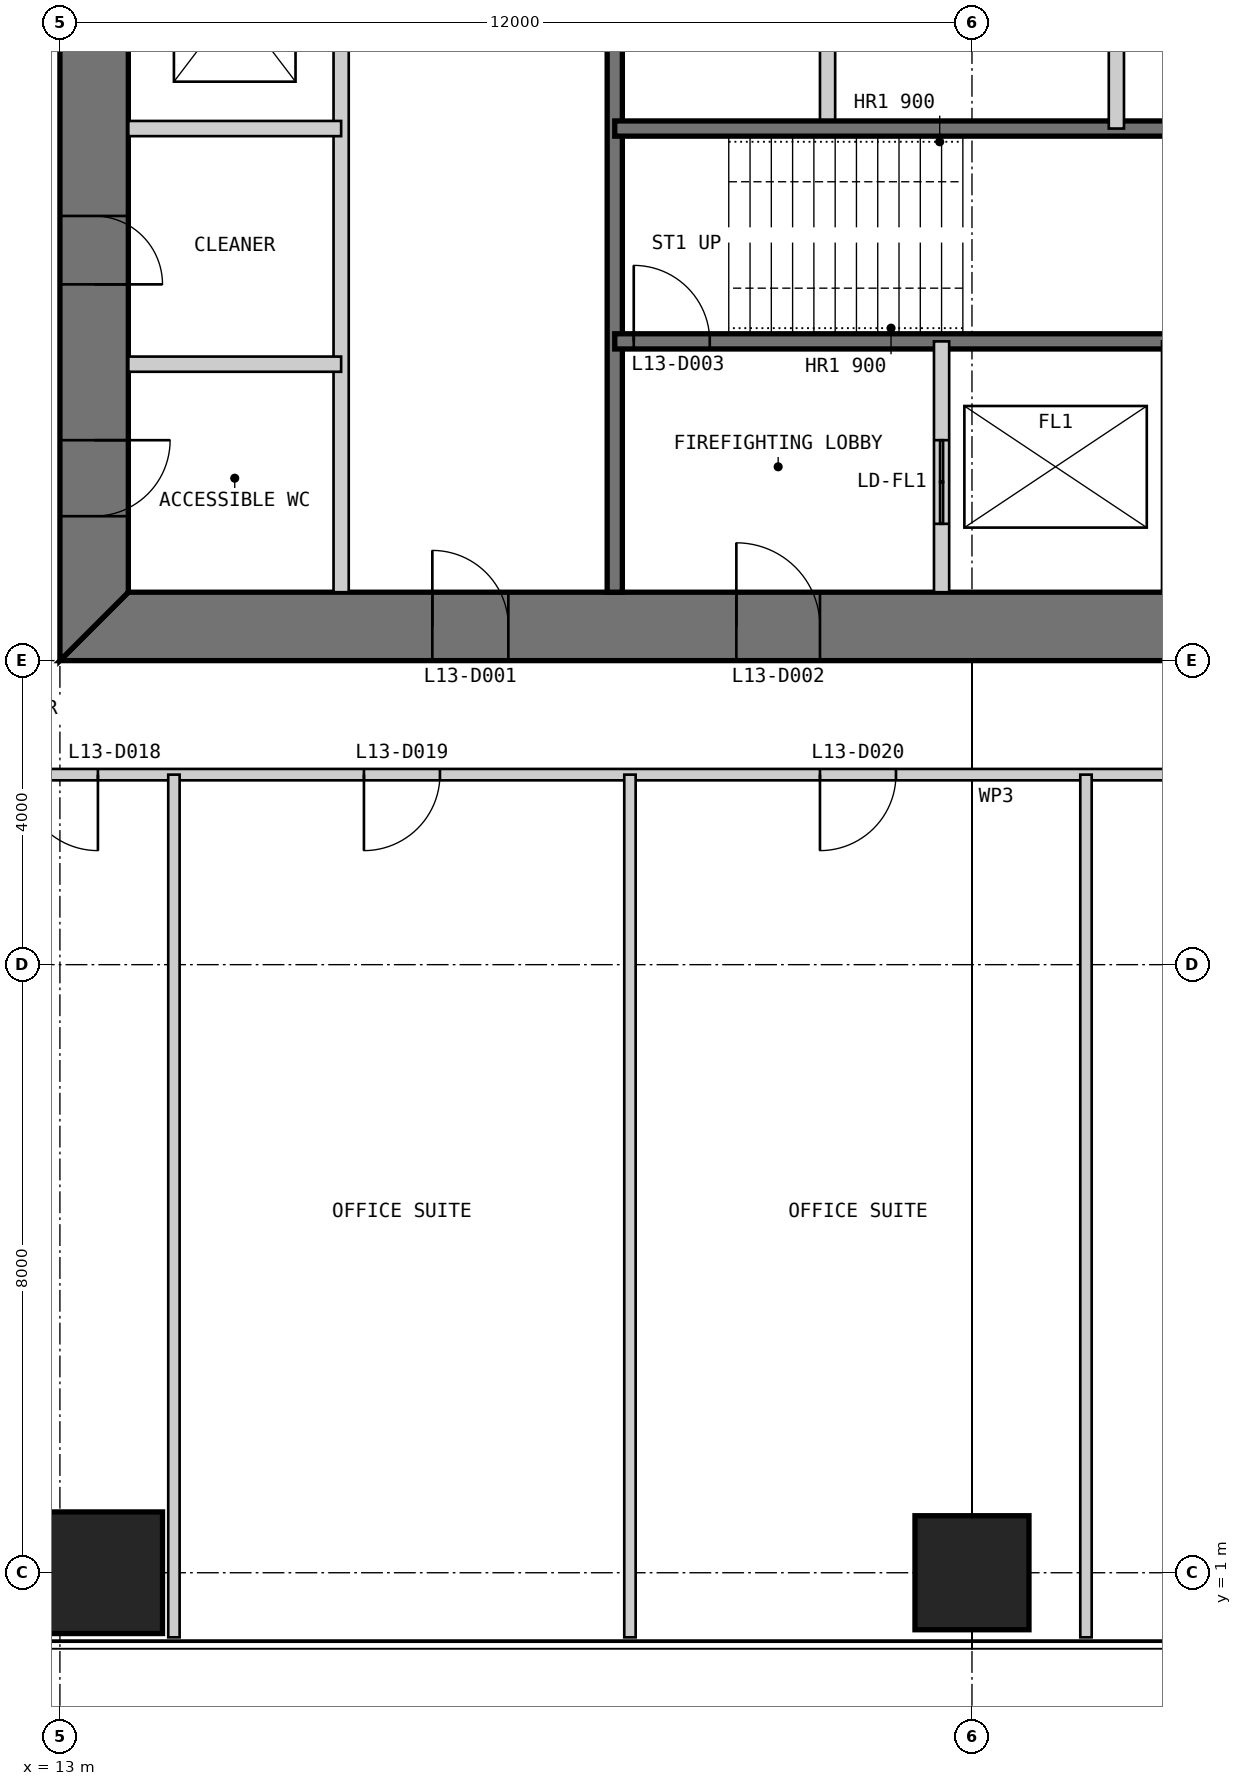
"""IFC4 building model, lengths in metres.
Left out: names, types, materials, properties, quantities, classifications, styles, units other than length and angle.
Written with IfcOpenShell. Run it as: python <this file> out.ifc"""

import sys

from ifc_helpers import new_model, si_unit, direction, frame, frame_2d, origin, origin_2d, place, context, subcontext, project, spatial, polyline, rectangle, outline, extrude, element, fill, save


model = new_model("IFC4")
c1 = context("Model", 3, precision=1e-05, world=origin(), true_north=direction((0.0, 1.0)))
c2 = subcontext(c1, "Body", "Model", "MODEL_VIEW")
j1 = project(units=[si_unit("LENGTHUNIT", "METRE"), si_unit("PLANEANGLEUNIT", "RADIAN")], contexts=[c1])
p1 = place(None, origin())
s1 = spatial("IfcSite", under=j1, at=p1, CompositionType="ELEMENT")
p2 = place(p1, origin())
s2 = spatial("IfcBuilding", under=s1, at=p2, CompositionType="ELEMENT")
p3 = place(p2, frame((0.0, 0.0, 59.0)))
s3 = spatial("IfcBuildingStorey", under=s2, at=p3, CompositionType="ELEMENT", Elevation=59.0)
p4 = place(p3, frame((13.0, 1.0, 0.0), z_axis=(0.0, 0.0, 1.0), x_axis=(1.0, 0.0, 0.0)))
e1 = element("IfcColumn", 1, at=p4, inside=s3, PredefinedType="COLUMN", context=c2, shape_type="SweptSolid", body=[
    extrude(rectangle(XDim=2.7, YDim=1.6, at=origin_2d()), origin(), (0.0, 0.0, 1.0), 4.0),
])
p5 = place(p3, frame((25.0, 1.0, 0.0), z_axis=(0.0, 0.0, 1.0), x_axis=(1.0, 0.0, 0.0)))
e2 = element("IfcColumn", 2, at=p5, inside=s3, PredefinedType="COLUMN", context=c2, shape_type="SweptSolid", body=[
    extrude(rectangle(XDim=1.5, YDim=1.5, at=origin_2d()), origin(), (0.0, 0.0, 1.0), 4.0),
])
p6 = place(p3, frame((13.0, 13.45, 0.0), z_axis=(0.0, 0.0, 1.0), x_axis=(1.0, 0.0, 0.0)))
e3 = element("IfcWall", 3, at=p6, inside=s3, PredefinedType="SHEAR", context=c2, shape_type="SweptSolid", body=[
    extrude(outline(polyline([(0.0, -0.45), (24.0, -0.45), (23.1, 0.45), (0.9, 0.45), (0.0, -0.45)])), origin(), (0.0, 0.0, 1.0), 4.0),
])
p7 = place(p6, frame((4.9, 0.0, 0.0)))
e4 = element("IfcOpeningElement", 4, at=p7, cuts=e3, PredefinedType="OPENING", context=c2, shape_type="SweptSolid", body=[
    extrude(rectangle(XDim=1.0, YDim=2.2, at=frame_2d((0.5, 1.1))), frame((0.0, 0.46, 0.0), z_axis=(0.0, -1.0, 0.0), x_axis=(1.0, 0.0, 0.0)), (0.0, 0.0, 1.0), 0.92),
])
p8 = place(p6, frame((8.9, 0.0, 0.0)))
e5 = element("IfcOpeningElement", 5, at=p8, cuts=e3, PredefinedType="OPENING", context=c2, shape_type="SweptSolid", body=[
    extrude(rectangle(XDim=1.1, YDim=2.2, at=frame_2d((0.55, 1.1))), frame((0.0, 0.46, 0.0), z_axis=(0.0, -1.0, 0.0), x_axis=(1.0, 0.0, 0.0)), (0.0, 0.0, 1.0), 0.92),
])
p9 = place(p6, frame((15.05, 0.0, 0.0)))
e6 = element("IfcOpeningElement", 6, at=p9, cuts=e3, PredefinedType="OPENING", context=c2, shape_type="SweptSolid", body=[
    extrude(rectangle(XDim=0.9, YDim=2.2, at=frame_2d((0.45, 1.1))), frame((0.0, 0.46, 0.0), z_axis=(0.0, -1.0, 0.0), x_axis=(1.0, 0.0, 0.0)), (0.0, 0.0, 1.0), 0.92),
])
p10 = place(p6, frame((17.9, 0.0, 0.0)))
e7 = element("IfcOpeningElement", 7, at=p10, cuts=e3, PredefinedType="OPENING", context=c2, shape_type="SweptSolid", body=[
    extrude(rectangle(XDim=1.0, YDim=2.2, at=frame_2d((0.5, 1.1))), frame((0.0, 0.46, 0.0), z_axis=(0.0, -1.0, 0.0), x_axis=(1.0, 0.0, 0.0)), (0.0, 0.0, 1.0), 0.92),
])
p11 = place(p6, frame((21.4, 0.0, 0.0)))
e8 = element("IfcOpeningElement", 8, at=p11, cuts=e3, PredefinedType="OPENING", context=c2, shape_type="SweptSolid", body=[
    extrude(rectangle(XDim=1.0, YDim=2.2, at=frame_2d((0.5, 1.1))), frame((0.0, 0.46, 0.0), z_axis=(0.0, -1.0, 0.0), x_axis=(1.0, 0.0, 0.0)), (0.0, 0.0, 1.0), 0.92),
])
p12 = place(p3, frame((13.45, 36.1, 0.0), z_axis=(0.0, 0.0, 1.0), x_axis=(0.0, -1.0, 0.0)))
e9 = element("IfcWall", 9, at=p12, inside=s3, PredefinedType="SHEAR", context=c2, shape_type="SweptSolid", body=[
    extrude(outline(polyline([(-0.9, -0.45), (23.1, -0.45), (22.2, 0.45), (0.0, 0.45), (-0.9, -0.45)])), origin(), (0.0, 0.0, 1.0), 4.0),
])
p13 = place(p12, frame((20.2, 0.0, 0.0)))
e10 = element("IfcOpeningElement", 10, at=p13, cuts=e9, PredefinedType="OPENING", context=c2, shape_type="SweptSolid", body=[
    extrude(rectangle(XDim=1.0, YDim=2.2, at=frame_2d((0.5, 1.1))), frame((0.0, 0.46, 0.0), z_axis=(0.0, -1.0, 0.0), x_axis=(1.0, 0.0, 0.0)), (0.0, 0.0, 1.0), 0.92),
])
p14 = place(p12, frame((17.25, 0.0, 0.0)))
e11 = element("IfcOpeningElement", 11, at=p14, cuts=e9, PredefinedType="OPENING", context=c2, shape_type="SweptSolid", body=[
    extrude(rectangle(XDim=0.9, YDim=2.2, at=frame_2d((0.45, 1.1))), frame((0.0, 0.46, 0.0), z_axis=(0.0, -1.0, 0.0), x_axis=(1.0, 0.0, 0.0)), (0.0, 0.0, 1.0), 0.92),
])
p15 = place(p3, frame((16.7, 13.9, 0.0), z_axis=(0.0, 0.0, 1.0), x_axis=(0.0, 1.0, 0.0)))
e12 = element("IfcWall", 12, at=p15, inside=s3, PredefinedType="PARTITIONING", context=c2, shape_type="SweptSolid", body=[
    extrude(rectangle(XDim=16.1, YDim=0.2, at=frame_2d((8.05, 0.0))), origin(), (0.0, 0.0, 1.0), 3.8),
])
p16 = place(p15, frame((7.217, 0.0, 0.0)))
e13 = element("IfcOpeningElement", 13, at=p16, cuts=e12, PredefinedType="OPENING", context=c2, shape_type="SweptSolid", body=[
    extrude(rectangle(XDim=1.1, YDim=2.2, at=frame_2d((0.55, 1.1))), frame((0.0, 0.11, 0.0), z_axis=(0.0, -1.0, 0.0), x_axis=(1.0, 0.0, 0.0)), (0.0, 0.0, 1.0), 0.22),
])
p17 = place(p15, frame((10.55, 0.0, 0.0)))
e14 = element("IfcOpeningElement", 14, at=p17, cuts=e12, PredefinedType="OPENING", context=c2, shape_type="SweptSolid", body=[
    extrude(rectangle(XDim=1.1, YDim=2.2, at=frame_2d((0.55, 1.1))), frame((0.0, 0.11, 0.0), z_axis=(0.0, -1.0, 0.0), x_axis=(1.0, 0.0, 0.0)), (0.0, 0.0, 1.0), 0.22),
])
p18 = place(p15, frame((13.883, 0.0, 0.0)))
e15 = element("IfcOpeningElement", 15, at=p18, cuts=e12, PredefinedType="OPENING", context=c2, shape_type="SweptSolid", body=[
    extrude(rectangle(XDim=1.1, YDim=2.2, at=frame_2d((0.55, 1.1))), frame((0.0, 0.11, 0.0), z_axis=(0.0, -1.0, 0.0), x_axis=(1.0, 0.0, 0.0)), (0.0, 0.0, 1.0), 0.22),
])
p19 = place(p3, frame((20.3, 13.9, 0.0), z_axis=(0.0, 0.0, 1.0), x_axis=(0.0, 1.0, 0.0)))
e16 = element("IfcWall", 16, at=p19, inside=s3, PredefinedType="SOLIDWALL", context=c2, shape_type="SweptSolid", body=[
    extrude(rectangle(XDim=16.1, YDim=0.2, at=frame_2d((8.05, 0.0))), origin(), (0.0, 0.0, 1.0), 3.8),
])
p20 = place(p3, frame((13.9, 20.0, 0.0), z_axis=(0.0, 0.0, 1.0), x_axis=(1.0, 0.0, 0.0)))
e17 = element("IfcWall", 17, at=p20, inside=s3, PredefinedType="PARTITIONING", context=c2, shape_type="SweptSolid", body=[
    extrude(rectangle(XDim=2.8, YDim=0.2, at=frame_2d((1.4, 0.0))), origin(), (0.0, 0.0, 1.0), 3.8),
])
p21 = place(p3, frame((23.1, 20.0, 0.0), z_axis=(0.0, 0.0, 1.0), x_axis=(0.0, 1.0, 0.0)))
e18 = element("IfcWall", 18, at=p21, inside=s3, PredefinedType="PARTITIONING", context=c2, shape_type="SweptSolid", body=[
    extrude(rectangle(XDim=10.0, YDim=0.2, at=frame_2d((5.0, 0.0))), origin(), (0.0, 0.0, 1.0), 3.8),
])
p22 = place(p3, frame((20.3, 17.2, 0.0), z_axis=(0.0, 0.0, 1.0), x_axis=(1.0, 0.0, 0.0)))
e19 = element("IfcWall", 19, at=p22, inside=s3, PredefinedType="SOLIDWALL", context=c2, shape_type="SweptSolid", body=[
    extrude(rectangle(XDim=9.4, YDim=0.2, at=frame_2d((4.7, 0.0))), origin(), (0.0, 0.0, 1.0), 3.8),
])
p23 = place(p22, frame((0.25, 0.0, 0.0)))
e20 = element("IfcOpeningElement", 20, at=p23, cuts=e19, PredefinedType="OPENING", context=c2, shape_type="SweptSolid", body=[
    extrude(rectangle(XDim=1.0, YDim=2.2, at=frame_2d((0.5, 1.1))), frame((0.0, 0.11, 0.0), z_axis=(0.0, -1.0, 0.0), x_axis=(1.0, 0.0, 0.0)), (0.0, 0.0, 1.0), 0.22),
])
p24 = place(p3, frame((20.3, 20.0, 0.0), z_axis=(0.0, 0.0, 1.0), x_axis=(1.0, 0.0, 0.0)))
e21 = element("IfcWall", 21, at=p24, inside=s3, PredefinedType="SOLIDWALL", context=c2, shape_type="SweptSolid", body=[
    extrude(rectangle(XDim=15.8, YDim=0.2, at=frame_2d((7.9, 0.0))), origin(), (0.0, 0.0, 1.0), 3.8),
])
p25 = place(p3, frame((24.6, 13.9, 0.0), z_axis=(0.0, 0.0, 1.0), x_axis=(0.0, 1.0, 0.0)))
e22 = element("IfcWall", 22, at=p25, inside=s3, PredefinedType="PARTITIONING", context=c2, shape_type="SweptSolid", body=[
    extrude(rectangle(XDim=3.3, YDim=0.2, at=frame_2d((1.65, 0.0))), origin(), (0.0, 0.0, 1.0), 3.8),
])
p26 = place(p25, frame((0.9, 0.0, 0.0)))
e23 = element("IfcOpeningElement", 23, at=p26, cuts=e22, PredefinedType="OPENING", context=c2, shape_type="SweptSolid", body=[
    extrude(rectangle(XDim=1.1, YDim=2.2, at=frame_2d((0.55, 1.1))), frame((0.0, 0.11, 0.0), z_axis=(0.0, -1.0, 0.0), x_axis=(1.0, 0.0, 0.0)), (0.0, 0.0, 1.0), 0.22),
])
p27 = place(p3, frame((13.9, 16.9, 0.0), z_axis=(0.0, 0.0, 1.0), x_axis=(1.0, 0.0, 0.0)))
e24 = element("IfcWall", 24, at=p27, inside=s3, PredefinedType="PARTITIONING", context=c2, shape_type="SweptSolid", body=[
    extrude(rectangle(XDim=2.8, YDim=0.2, at=frame_2d((1.4, 0.0))), origin(), (0.0, 0.0, 1.0), 3.8),
])
p28 = place(p3, frame((26.9, 30.0, 0.0), z_axis=(0.0, 0.0, 1.0), x_axis=(0.0, -1.0, 0.0)))
e25 = element("IfcWall", 25, at=p28, inside=s3, PredefinedType="PARTITIONING", context=c2, shape_type="SweptSolid", body=[
    extrude(rectangle(XDim=10.0, YDim=0.2, at=frame_2d((5.0, 0.0))), origin(), (0.0, 0.0, 1.0), 3.8),
])
p29 = place(p3, frame((11.5, 11.5, 0.0), z_axis=(0.0, 0.0, 1.0), x_axis=(1.0, 0.0, 0.0)))
e26 = element("IfcWall", 26, at=p29, inside=s3, PredefinedType="PARTITIONING", context=c2, shape_type="SweptSolid", body=[
    extrude(rectangle(XDim=27.0, YDim=0.15, at=frame_2d((13.5, 0.0))), origin(), (0.0, 0.0, 1.0), 3.85),
])
p30 = place(p29, frame((1.0, 0.0, 0.0)))
e27 = element("IfcOpeningElement", 27, at=p30, cuts=e26, PredefinedType="OPENING", context=c2, shape_type="SweptSolid", body=[
    extrude(rectangle(XDim=1.0, YDim=2.2, at=frame_2d((0.5, 1.1))), frame((0.0, 0.085, 0.0), z_axis=(0.0, -1.0, 0.0), x_axis=(1.0, 0.0, 0.0)), (0.0, 0.0, 1.0), 0.17),
])
p31 = place(p29, frame((5.5, 0.0, 0.0)))
e28 = element("IfcOpeningElement", 28, at=p31, cuts=e26, PredefinedType="OPENING", context=c2, shape_type="SweptSolid", body=[
    extrude(rectangle(XDim=1.0, YDim=2.2, at=frame_2d((0.5, 1.1))), frame((0.0, 0.085, 0.0), z_axis=(0.0, -1.0, 0.0), x_axis=(1.0, 0.0, 0.0)), (0.0, 0.0, 1.0), 0.17),
])
p32 = place(p29, frame((11.5, 0.0, 0.0)))
e29 = element("IfcOpeningElement", 29, at=p32, cuts=e26, PredefinedType="OPENING", context=c2, shape_type="SweptSolid", body=[
    extrude(rectangle(XDim=1.0, YDim=2.2, at=frame_2d((0.5, 1.1))), frame((0.0, 0.085, 0.0), z_axis=(0.0, -1.0, 0.0), x_axis=(1.0, 0.0, 0.0)), (0.0, 0.0, 1.0), 0.17),
])
p33 = place(p29, frame((19.0, 0.0, 0.0)))
e30 = element("IfcOpeningElement", 30, at=p33, cuts=e26, PredefinedType="OPENING", context=c2, shape_type="SweptSolid", body=[
    extrude(rectangle(XDim=1.0, YDim=2.2, at=frame_2d((0.5, 1.1))), frame((0.0, 0.085, 0.0), z_axis=(0.0, -1.0, 0.0), x_axis=(1.0, 0.0, 0.0)), (0.0, 0.0, 1.0), 0.17),
])
for number, where, z_axis, x_axis in (
    (31, (14.5, 0.15, 0.0), (0.0, 0.0, 1.0), (0.0, 1.0, 0.0)),
    (32, (20.5, 0.15, 0.0), (0.0, 0.0, 1.0), (0.0, 1.0, 0.0)),
    (33, (26.5, 0.15, 0.0), (0.0, 0.0, 1.0), (0.0, 1.0, 0.0)),
):
    element("IfcWall", number, at=place(p3, frame(where, z_axis=z_axis, x_axis=x_axis)), inside=s3, PredefinedType="PARTITIONING", context=c2, shape_type="SweptSolid", body=[
        extrude(rectangle(XDim=11.35, YDim=0.15, at=frame_2d((5.675, 0.0))), origin(), (0.0, 0.0, 1.0), 3.85),
    ])
p34 = place(p7, origin())
e34 = element("IfcDoor", 34, at=p34, inside=s3, OperationType="SINGLE_SWING_LEFT", PredefinedType="DOOR", context=c2, shape_type="SweptSolid", body=[
    extrude(rectangle(XDim=1.0, YDim=2.2, at=frame_2d((0.5, 1.1))), frame((0.0, 0.025, 0.0), z_axis=(0.0, -1.0, 0.0), x_axis=(1.0, 0.0, 0.0)), (0.0, 0.0, 1.0), 0.05),
    extrude(outline(polyline([(0.0, 0.0), (0.04, 0.0), (0.04, 2.16), (0.96, 2.16), (0.96, 0.0), (1.0, 0.0), (1.0, 2.2), (0.0, 2.2), (0.0, 0.0)])), frame((0.0, 0.3, 0.0), z_axis=(0.0, -1.0, 0.0), x_axis=(1.0, 0.0, 0.0)), (0.0, 0.0, 1.0), 0.6),
])
fill(e4, e34)
p35 = place(p8, origin())
e35 = element("IfcDoor", 35, at=p35, inside=s3, OperationType="SINGLE_SWING_LEFT", PredefinedType="DOOR", context=c2, shape_type="SweptSolid", body=[
    extrude(rectangle(XDim=1.1, YDim=2.2, at=frame_2d((0.55, 1.1))), frame((0.0, 0.025, 0.0), z_axis=(0.0, -1.0, 0.0), x_axis=(1.0, 0.0, 0.0)), (0.0, 0.0, 1.0), 0.05),
    extrude(outline(polyline([(0.0, 0.0), (0.04, 0.0), (0.04, 2.16), (1.06, 2.16), (1.06, 0.0), (1.1, 0.0), (1.1, 2.2), (0.0, 2.2), (0.0, 0.0)])), frame((0.0, 0.3, 0.0), z_axis=(0.0, -1.0, 0.0), x_axis=(1.0, 0.0, 0.0)), (0.0, 0.0, 1.0), 0.6),
])
fill(e5, e35)
p36 = place(p23, origin())
e36 = element("IfcDoor", 36, at=p36, inside=s3, OperationType="SINGLE_SWING_LEFT", PredefinedType="DOOR", context=c2, shape_type="SweptSolid", body=[
    extrude(rectangle(XDim=1.0, YDim=2.2, at=frame_2d((0.5, 1.1))), frame((0.0, 0.025, 0.0), z_axis=(0.0, -1.0, 0.0), x_axis=(1.0, 0.0, 0.0)), (0.0, 0.0, 1.0), 0.05),
])
fill(e20, e36)
p37 = place(p13, origin())
e37 = element("IfcDoor", 37, at=p37, inside=s3, OperationType="SINGLE_SWING_LEFT", PredefinedType="DOOR", context=c2, shape_type="SweptSolid", body=[
    extrude(rectangle(XDim=1.0, YDim=2.2, at=frame_2d((0.5, 1.1))), frame((0.0, 0.025, 0.0), z_axis=(0.0, -1.0, 0.0), x_axis=(1.0, 0.0, 0.0)), (0.0, 0.0, 1.0), 0.05),
    extrude(outline(polyline([(0.0, 0.0), (0.04, 0.0), (0.04, 2.16), (0.96, 2.16), (0.96, 0.0), (1.0, 0.0), (1.0, 2.2), (0.0, 2.2), (0.0, 0.0)])), frame((0.0, 0.3, 0.0), z_axis=(0.0, -1.0, 0.0), x_axis=(1.0, 0.0, 0.0)), (0.0, 0.0, 1.0), 0.6),
])
fill(e10, e37)
p38 = place(p14, origin())
e38 = element("IfcDoor", 38, at=p38, inside=s3, OperationType="SINGLE_SWING_RIGHT", PredefinedType="DOOR", context=c2, shape_type="SweptSolid", body=[
    extrude(rectangle(XDim=0.9, YDim=2.2, at=frame_2d((0.45, 1.1))), frame((0.0, 0.025, 0.0), z_axis=(0.0, -1.0, 0.0), x_axis=(1.0, 0.0, 0.0)), (0.0, 0.0, 1.0), 0.05),
    extrude(outline(polyline([(0.0, 0.0), (0.04, 0.0), (0.04, 2.16), (0.86, 2.16), (0.86, 0.0), (0.9, 0.0), (0.9, 2.2), (0.0, 2.2), (0.0, 0.0)])), frame((0.0, 0.3, 0.0), z_axis=(0.0, -1.0, 0.0), x_axis=(1.0, 0.0, 0.0)), (0.0, 0.0, 1.0), 0.6),
])
fill(e11, e38)
p39 = place(p30, frame((1.0, 0.0, 0.0), z_axis=(0.0, 0.0, 1.0), x_axis=(-1.0, 0.0, 0.0)))
e39 = element("IfcDoor", 39, at=p39, inside=s3, OperationType="SINGLE_SWING_LEFT", PredefinedType="DOOR", context=c2, shape_type="SweptSolid", body=[
    extrude(rectangle(XDim=1.0, YDim=2.2, at=frame_2d((0.5, 1.1))), frame((0.0, 0.025, 0.0), z_axis=(0.0, -1.0, 0.0), x_axis=(1.0, 0.0, 0.0)), (0.0, 0.0, 1.0), 0.05),
])
fill(e27, e39)
p40 = place(p31, frame((1.0, 0.0, 0.0), z_axis=(0.0, 0.0, 1.0), x_axis=(-1.0, 0.0, 0.0)))
e40 = element("IfcDoor", 40, at=p40, inside=s3, OperationType="SINGLE_SWING_RIGHT", PredefinedType="DOOR", context=c2, shape_type="SweptSolid", body=[
    extrude(rectangle(XDim=1.0, YDim=2.2, at=frame_2d((0.5, 1.1))), frame((0.0, 0.025, 0.0), z_axis=(0.0, -1.0, 0.0), x_axis=(1.0, 0.0, 0.0)), (0.0, 0.0, 1.0), 0.05),
])
fill(e28, e40)
p41 = place(p32, frame((1.0, 0.0, 0.0), z_axis=(0.0, 0.0, 1.0), x_axis=(-1.0, 0.0, 0.0)))
e41 = element("IfcDoor", 41, at=p41, inside=s3, OperationType="SINGLE_SWING_RIGHT", PredefinedType="DOOR", context=c2, shape_type="SweptSolid", body=[
    extrude(rectangle(XDim=1.0, YDim=2.2, at=frame_2d((0.5, 1.1))), frame((0.0, 0.025, 0.0), z_axis=(0.0, -1.0, 0.0), x_axis=(1.0, 0.0, 0.0)), (0.0, 0.0, 1.0), 0.05),
])
fill(e29, e41)
p42 = place(p26, origin())
e42 = element("IfcDoor", 42, at=p42, inside=s3, OperationType="DOUBLE_DOOR_SLIDING", PredefinedType="DOOR", context=c2, shape_type="SweptSolid", body=[
    extrude(rectangle(XDim=1.1, YDim=2.2, at=frame_2d((0.55, 1.1))), frame((0.0, 0.025, 0.0), z_axis=(0.0, -1.0, 0.0), x_axis=(1.0, 0.0, 0.0)), (0.0, 0.0, 1.0), 0.05),
])
fill(e23, e42)
save(model, sys.argv[1])
